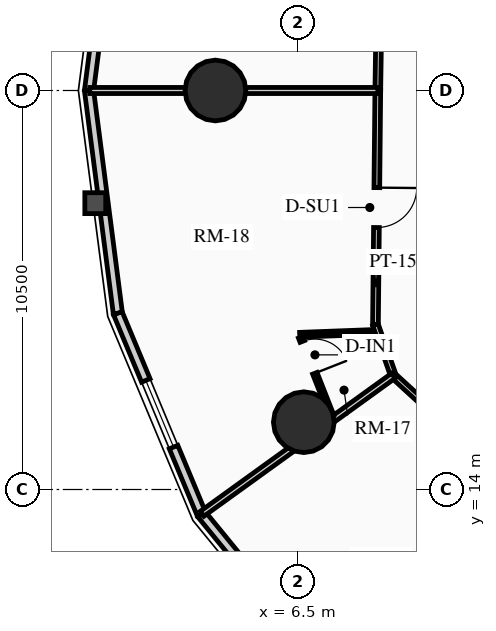
"""IFC4 building model, lengths in metres.
Left out: names, types, materials, properties, quantities, classifications, styles, units other than length and angle.
Written with IfcOpenShell. Run it as: python <this file> out.ifc"""

import sys

from ifc_helpers import new_model, si_unit, direction, frame, frame_2d, origin, origin_2d, place, context, subcontext, project, spatial, rectangle, circle, extrude, source, transform, mapped, element, fill, save


model = new_model("IFC4")
c1 = context("Model", 3, precision=1e-05, world=origin(), true_north=direction((0.0, 1.0)))
c2 = subcontext(c1, "Body", "Model", "MODEL_VIEW")
j1 = project(units=[si_unit("LENGTHUNIT", "METRE"), si_unit("PLANEANGLEUNIT", "RADIAN")], contexts=[c1])
p1 = place(None, origin())
s1 = spatial("IfcSite", under=j1, at=p1, CompositionType="ELEMENT")
p2 = place(p1, origin())
s2 = spatial("IfcBuilding", under=s1, at=p2, CompositionType="ELEMENT")
p3 = place(p2, frame((0.0, 0.0, 33.64)))
s3 = spatial("IfcBuildingStorey", under=s2, at=p3, CompositionType="ELEMENT", Elevation=33.64)
for number, where, z_axis, x_axis in (
    (1, (4.328, 24.5, 0.0), (0.0, 0.0, 1.0), (1.0, 0.0, 0.0)),
    (2, (6.653, 15.771, 0.0), (0.0, 0.0, 1.0), (1.0, 0.0, 0.0)),
):
    element("IfcColumn", number, at=place(p3, frame(where, z_axis=z_axis, x_axis=x_axis)), inside=s3, PredefinedType="USERDEFINED", context=c2, shape_type="SweptSolid", body=[
        extrude(circle(Radius=0.8, at=origin_2d()), origin(), (0.0, 0.0, 1.0), 2.91),
    ])
p4 = place(p3, frame((1.001, 24.5, 0.0), z_axis=(0.0, 0.0, 1.0), x_axis=(0.128329107357, 0.991731637191, 0.0)))
e3 = element("IfcWall", 3, at=p4, inside=s3, PredefinedType="SOLIDWALL", context=c2, shape_type="SweptSolid", body=[
    extrude(rectangle(XDim=5.911, YDim=0.24, at=frame_2d((2.956, 0.0))), origin(), (0.0, 0.0, 1.0), 2.073),
])
m1 = source(origin(), c2, "Body", "SweptSolid", [
    extrude(rectangle(XDim=2.2, YDim=1.35, at=frame_2d((1.1, 0.675))), frame((0.0, 0.13, 0.0), z_axis=(0.0, -1.0, 0.0), x_axis=(1.0, 0.0, 0.0)), (0.0, 0.0, 1.0), 0.26),
])
p5 = place(p4, frame((1.855, 0.0, 0.65)))
e4 = element("IfcOpeningElement", 4, at=p5, cuts=e3, PredefinedType="OPENING", context=c2, shape_type="MappedRepresentation", body=[
    mapped(m1, transform((0.0, 0.0, 0.0), x_axis=(1.0, 0.0, 0.0), y_axis=(0.0, 1.0, 0.0), z_axis=(0.0, 0.0, 1.0), scale=1.0)),
])
p6 = place(p3, frame((1.76, 18.638, 0.0), z_axis=(0.0, 0.0, 1.0), x_axis=(-0.128329107357, 0.991731637191, 0.0)))
e5 = element("IfcWall", 5, at=p6, inside=s3, PredefinedType="SOLIDWALL", context=c2, shape_type="SweptSolid", body=[
    extrude(rectangle(XDim=5.911, YDim=0.24, at=frame_2d((2.956, 0.0))), origin(), (0.0, 0.0, 1.0), 2.073),
])
p7 = place(p3, frame((3.961, 13.35, 0.0), z_axis=(0.0, 0.0, 1.0), x_axis=(-0.38430970593, 0.923204229804, 0.0)))
e6 = element("IfcWall", 6, at=p7, inside=s3, PredefinedType="SOLIDWALL", context=c2, shape_type="SweptSolid", body=[
    extrude(rectangle(XDim=5.728, YDim=0.24, at=frame_2d((2.864, 0.0))), origin(), (0.0, 0.0, 1.0), 2.073),
])
m2 = source(origin(), c2, "Body", "SweptSolid", [
    extrude(rectangle(XDim=1.9, YDim=1.35, at=frame_2d((0.95, 0.675))), frame((0.0, 0.13, 0.0), z_axis=(0.0, -1.0, 0.0), x_axis=(1.0, 0.0, 0.0)), (0.0, 0.0, 1.0), 0.26),
])
p8 = place(p7, frame((1.914, 0.0, 0.65)))
e7 = element("IfcOpeningElement", 7, at=p8, cuts=e6, PredefinedType="OPENING", context=c2, shape_type="MappedRepresentation", body=[
    mapped(m2, transform((0.0, 0.0, 0.0), x_axis=(1.0, 0.0, 0.0), y_axis=(0.0, 1.0, 0.0), z_axis=(0.0, 0.0, 1.0), scale=1.0)),
])
p9 = place(p3, frame((7.39, 9.153, 0.0), z_axis=(0.0, 0.0, 1.0), x_axis=(-0.632710215588, 0.774388651189, 0.0)))
e8 = element("IfcWall", 8, at=p9, inside=s3, PredefinedType="SOLIDWALL", context=c2, shape_type="SweptSolid", body=[
    extrude(rectangle(XDim=5.419, YDim=0.24, at=frame_2d((2.71, 0.0))), origin(), (0.0, 0.0, 1.0), 2.073),
])
p10 = place(p3, frame((8.693, 30.544, 0.0), z_axis=(0.0, 0.0, 1.0), x_axis=(-0.015307007986, -0.99988284089, 0.0)))
e9 = element("IfcWall", 9, at=p10, inside=s3, PredefinedType="PARTITIONING", context=c2, shape_type="SweptSolid", body=[
    extrude(rectangle(XDim=6.045, YDim=0.15, at=frame_2d((3.022, 0.0))), origin(), (0.0, 0.0, 1.0), 2.635),
])
m3 = source(origin(), c2, "Body", "SweptSolid", [
    extrude(rectangle(XDim=1.05, YDim=2.015, at=frame_2d((0.525, 1.007))), frame((0.0, 0.085, 0.0), z_axis=(0.0, -1.0, 0.0), x_axis=(1.0, 0.0, 0.0)), (0.0, 0.0, 1.0), 0.17),
])
p11 = place(p10, frame((2.497, 0.0, 0.0)))
e10 = element("IfcOpeningElement", 10, at=p11, cuts=e9, PredefinedType="OPENING", context=c2, shape_type="MappedRepresentation", body=[
    mapped(m3, transform((0.0, 0.0, 0.0), x_axis=(1.0, 0.0, 0.0), y_axis=(0.0, 1.0, 0.0), z_axis=(0.0, 0.0, 1.0), scale=1.0)),
])
p12 = place(p3, frame((8.6, 24.5, 0.0), z_axis=(0.0, 0.0, 1.0), x_axis=(-0.010023665349, -0.999949761805, 0.0)))
e11 = element("IfcWall", 11, at=p12, inside=s3, PredefinedType="PARTITIONING", context=c2, shape_type="SweptSolid", body=[
    extrude(rectangle(XDim=6.162, YDim=0.15, at=frame_2d((3.081, 0.0))), origin(), (0.0, 0.0, 1.0), 2.159),
])
p13 = place(p12, frame((2.556, 0.0, 0.0)))
e12 = element("IfcOpeningElement", 12, at=p13, cuts=e11, PredefinedType="OPENING", context=c2, shape_type="MappedRepresentation", body=[
    mapped(m3, transform((0.0, 0.0, 0.0), x_axis=(1.0, 0.0, 0.0), y_axis=(0.0, 1.0, 0.0), z_axis=(0.0, 0.0, 1.0), scale=1.0)),
])
p14 = place(p3, frame((8.538, 18.338, 0.0), z_axis=(0.0, 0.0, 1.0), x_axis=(0.331358150167, -0.94350504838, 0.0)))
e13 = element("IfcWall", 13, at=p14, inside=s3, PredefinedType="PARTITIONING", context=c2, shape_type="SweptSolid", body=[
    extrude(rectangle(XDim=1.424, YDim=0.15, at=frame_2d((0.712, 0.0))), origin(), (0.0, 0.0, 1.0), 2.205),
])
p15 = place(p3, frame((9.01, 16.994, 0.0), z_axis=(0.0, 0.0, 1.0), x_axis=(0.737701798986, -0.67512669609, 0.0)))
e14 = element("IfcWall", 14, at=p15, inside=s3, PredefinedType="PARTITIONING", context=c2, shape_type="SweptSolid", body=[
    extrude(rectangle(XDim=1.498, YDim=0.15, at=frame_2d((0.749, 0.0))), origin(), (0.0, 0.0, 1.0), 2.159),
])
p16 = place(p3, frame((8.6, 24.5, 0.0), z_axis=(0.0, 0.0, 1.0), x_axis=(-1.0, 0.0, 0.0)))
e15 = element("IfcWall", 15, at=p16, inside=s3, PredefinedType="PARTITIONING", context=c2, shape_type="SweptSolid", body=[
    extrude(rectangle(XDim=7.579, YDim=0.16, at=frame_2d((3.79, 0.0))), origin(), (0.0, 0.0, 1.0), 2.073),
])
p17 = place(p3, frame((9.01, 16.994, 0.0), z_axis=(0.0, 0.0, 1.0), x_axis=(-0.810839958558, -0.585267940012, 0.0)))
e16 = element("IfcWall", 16, at=p17, inside=s3, PredefinedType="PARTITIONING", context=c2, shape_type="SweptSolid", body=[
    extrude(rectangle(XDim=6.207, YDim=0.16, at=frame_2d((3.104, 0.0))), origin(), (0.0, 0.0, 1.0), 2.073),
])
p18 = place(p3, frame((8.409, 18.143, 0.0), z_axis=(0.0, 0.0, 1.0), x_axis=(-0.999294242072, -0.037563516369, 0.0)))
e17 = element("IfcWall", 17, at=p18, inside=s3, PredefinedType="PARTITIONING", context=c2, shape_type="SweptSolid", body=[
    extrude(rectangle(XDim=1.865, YDim=0.125, at=frame_2d((0.933, 0.0))), origin(), (0.0, 0.0, 1.0), 2.205),
])
p19 = place(p3, frame((6.57, 18.008, 0.0), z_axis=(0.0, 0.0, 1.0), x_axis=(0.365917141159, -0.930647433675, 0.0)))
e18 = element("IfcWall", 18, at=p19, inside=s3, PredefinedType="PARTITIONING", context=c2, shape_type="SweptSolid", body=[
    extrude(rectangle(XDim=2.225, YDim=0.125, at=frame_2d((1.113, 0.0))), origin(), (0.0, 0.0, 1.0), 2.159),
])
m4 = source(origin(), c2, "Body", "SweptSolid", [
    extrude(rectangle(XDim=0.9, YDim=2.005, at=frame_2d((0.45, 1.002))), frame((0.0, 0.073, 0.0), z_axis=(0.0, -1.0, 0.0), x_axis=(1.0, 0.0, 0.0)), (0.0, 0.0, 1.0), 0.145),
])
p20 = place(p19, frame((0.12, 0.0, 0.0)))
e19 = element("IfcOpeningElement", 19, at=p20, cuts=e18, PredefinedType="OPENING", context=c2, shape_type="MappedRepresentation", body=[
    mapped(m4, transform((0.0, 0.0, 0.0), x_axis=(1.0, 0.0, 0.0), y_axis=(0.0, 1.0, 0.0), z_axis=(0.0, 0.0, 1.0), scale=1.0)),
])
m5 = source(origin(), c2, "Body", "SweptSolid", [
    extrude(rectangle(XDim=1.9, YDim=1.35, at=frame_2d((0.95, 0.675))), frame((0.0, 0.03, 0.0), z_axis=(0.0, -1.0, 0.0), x_axis=(1.0, 0.0, 0.0)), (0.0, 0.0, 1.0), 0.06),
])
p21 = place(p8, origin())
e20 = element("IfcWindow", 20, at=p21, inside=s3, PartitioningType="DOUBLE_PANEL_VERTICAL", PredefinedType="WINDOW", context=c2, shape_type="MappedRepresentation", body=[
    mapped(m5, transform((0.0, 0.0, 0.0), x_axis=(1.0, 0.0, 0.0), y_axis=(0.0, 1.0, 0.0), z_axis=(0.0, 0.0, 1.0), scale=1.0)),
])
fill(e7, e20)
m6 = source(origin(), c2, "Body", "SweptSolid", [
    extrude(rectangle(XDim=1.05, YDim=2.015, at=frame_2d((0.525, 1.007))), frame((0.0, 0.025, 0.0), z_axis=(0.0, -1.0, 0.0), x_axis=(1.0, 0.0, 0.0)), (0.0, 0.0, 1.0), 0.05),
])
p22 = place(p13, origin())
e21 = element("IfcDoor", 21, at=p22, inside=s3, OperationType="SINGLE_SWING_LEFT", PredefinedType="DOOR", context=c2, shape_type="MappedRepresentation", body=[
    mapped(m6, transform((0.0, 0.0, 0.0), x_axis=(1.0, 0.0, 0.0), y_axis=(0.0, 1.0, 0.0), z_axis=(0.0, 0.0, 1.0), scale=1.0)),
])
fill(e12, e21)
m7 = source(origin(), c2, "Body", "SweptSolid", [
    extrude(rectangle(XDim=0.9, YDim=2.005, at=frame_2d((0.45, 1.002))), frame((0.0, 0.025, 0.0), z_axis=(0.0, -1.0, 0.0), x_axis=(1.0, 0.0, 0.0)), (0.0, 0.0, 1.0), 0.05),
])
p23 = place(p20, origin())
e22 = element("IfcDoor", 22, at=p23, inside=s3, OperationType="SINGLE_SWING_RIGHT", PredefinedType="DOOR", context=c2, shape_type="MappedRepresentation", body=[
    mapped(m7, transform((0.0, 0.0, 0.0), x_axis=(1.0, 0.0, 0.0), y_axis=(0.0, 1.0, 0.0), z_axis=(0.0, 0.0, 1.0), scale=1.0)),
])
fill(e19, e22)
save(model, sys.argv[1])
